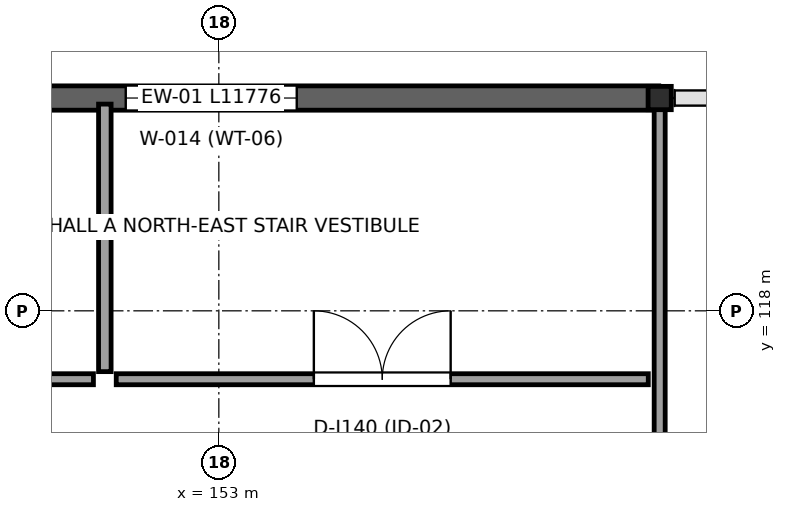
"""IFC4 building model, lengths in metres.
Left out: names, types, materials, properties, quantities, classifications, styles, units other than length and angle.
Written with IfcOpenShell. Run it as: python <this file> out.ifc"""

import sys

from ifc_helpers import new_model, si_unit, direction, frame, frame_2d, origin, origin_2d, place, context, subcontext, project, spatial, rectangle, i_section, extrude, element, fill, save


model = new_model("IFC4")
c1 = context("Model", 3, precision=1e-05, world=origin(), true_north=direction((0.0, 1.0)))
c2 = subcontext(c1, "Body", "Model", "MODEL_VIEW")
j1 = project(units=[si_unit("LENGTHUNIT", "METRE"), si_unit("PLANEANGLEUNIT", "RADIAN")], contexts=[c1])
p1 = place(None, origin())
s1 = spatial("IfcSite", under=j1, at=p1, CompositionType="ELEMENT")
p2 = place(p1, origin())
s2 = spatial("IfcBuilding", under=s1, at=p2, CompositionType="ELEMENT")
p3 = place(p2, frame((0.0, 0.0, 6.0)))
s3 = spatial("IfcBuildingStorey", under=s2, at=p3, CompositionType="ELEMENT", Elevation=6.0)
p4 = place(p3, frame((158.8, 120.8, 0.0), z_axis=(0.0, 0.0, 1.0), x_axis=(1.0, 0.0, 0.0)))
e1 = element("IfcColumn", 1, at=p4, inside=s3, PredefinedType="COLUMN", context=c2, shape_type="SweptSolid", body=[
    extrude(i_section(OverallWidth=0.305, OverallDepth=0.307, WebThickness=0.01, FlangeThickness=0.015, at=origin_2d()), origin(), (0.0, 0.0, 1.0), 6.0),
])
p5 = place(p3, frame((147.012, 120.8, 0.0), z_axis=(0.0, 0.0, 1.0), x_axis=(1.0, 0.0, 0.0)))
e2 = element("IfcWall", 2, at=p5, inside=s3, PredefinedType="STANDARD", context=c2, shape_type="SweptSolid", body=[
    extrude(rectangle(XDim=11.776, YDim=0.32, at=frame_2d((5.888, 0.0))), origin(), (0.0, 0.0, 1.0), 5.78),
])
p6 = place(p5, frame((4.763, 0.0, 1.1)))
e3 = element("IfcOpeningElement", 3, at=p6, cuts=e2, PredefinedType="OPENING", context=c2, shape_type="SweptSolid", body=[
    extrude(rectangle(XDim=2.25, YDim=2.4, at=frame_2d((1.125, 1.2))), frame((0.0, 0.17, 0.0), z_axis=(0.0, -1.0, 0.0), x_axis=(1.0, 0.0, 0.0)), (0.0, 0.0, 1.0), 0.34),
])
p7 = place(p3, frame((121.75, 117.1, 0.0), z_axis=(0.0, 0.0, 1.0), x_axis=(1.0, 0.0, 0.0)))
e4 = element("IfcWall", 4, at=p7, inside=s3, PredefinedType="PARTITIONING", context=c2, shape_type="SweptSolid", body=[
    extrude(rectangle(XDim=29.6, YDim=0.145, at=frame_2d((14.8, 0.0))), origin(), (0.0, 0.0, 1.0), 4.55),
])
p8 = place(p7, frame((2.5, 0.0, 0.0)))
e5 = element("IfcOpeningElement", 5, at=p8, cuts=e4, PredefinedType="OPENING", context=c2, shape_type="SweptSolid", body=[
    extrude(rectangle(XDim=0.98, YDim=2.15, at=frame_2d((0.49, 1.075))), frame((0.0, 0.083, 0.0), z_axis=(0.0, -1.0, 0.0), x_axis=(1.0, 0.0, 0.0)), (0.0, 0.0, 1.0), 0.165),
])
p9 = place(p7, frame((6.5, 0.0, 0.0)))
e6 = element("IfcOpeningElement", 6, at=p9, cuts=e4, PredefinedType="OPENING", context=c2, shape_type="SweptSolid", body=[
    extrude(rectangle(XDim=1.05, YDim=2.18, at=frame_2d((0.525, 1.09))), frame((0.0, 0.083, 0.0), z_axis=(0.0, -1.0, 0.0), x_axis=(1.0, 0.0, 0.0)), (0.0, 0.0, 1.0), 0.165),
])
p10 = place(p3, frame((151.65, 117.1, 0.0), z_axis=(0.0, 0.0, 1.0), x_axis=(1.0, 0.0, 0.0)))
e7 = element("IfcWall", 7, at=p10, inside=s3, PredefinedType="PARTITIONING", context=c2, shape_type="SweptSolid", body=[
    extrude(rectangle(XDim=7.0, YDim=0.145, at=frame_2d((3.5, 0.0))), origin(), (0.0, 0.0, 1.0), 4.55),
])
p11 = place(p10, frame((2.6, 0.0, 0.0)))
e8 = element("IfcOpeningElement", 8, at=p11, cuts=e7, PredefinedType="OPENING", context=c2, shape_type="SweptSolid", body=[
    extrude(rectangle(XDim=1.8, YDim=2.3, at=frame_2d((0.9, 1.15))), frame((0.0, 0.083, 0.0), z_axis=(0.0, -1.0, 0.0), x_axis=(1.0, 0.0, 0.0)), (0.0, 0.0, 1.0), 0.165),
])
p12 = place(p3, frame((151.5, 117.2, 0.0), z_axis=(0.0, 0.0, 1.0), x_axis=(0.0, 1.0, 0.0)))
e9 = element("IfcWall", 9, at=p12, inside=s3, PredefinedType="PARTITIONING", context=c2, shape_type="SweptSolid", body=[
    extrude(rectangle(XDim=3.52, YDim=0.165, at=frame_2d((1.76, 0.0))), origin(), (0.0, 0.0, 1.0), 4.55),
])
p13 = place(p3, frame((158.8, 111.948, 0.0), z_axis=(0.0, 0.0, 1.0), x_axis=(0.0, 1.0, 0.0)))
e10 = element("IfcWall", 10, at=p13, inside=s3, PredefinedType="PARTITIONING", context=c2, shape_type="SweptSolid", body=[
    extrude(rectangle(XDim=8.704, YDim=0.145, at=frame_2d((4.352, 0.0))), origin(), (0.0, 0.0, 1.0), 4.55),
])
p14 = place(p6, origin())
e11 = element("IfcWindow", 11, at=p14, inside=s3, PartitioningType="SINGLE_PANEL", PredefinedType="WINDOW", context=c2, shape_type="SweptSolid", body=[
    extrude(rectangle(XDim=2.25, YDim=2.4, at=frame_2d((1.125, 1.2))), frame((0.0, 0.03, 0.0), z_axis=(0.0, -1.0, 0.0), x_axis=(1.0, 0.0, 0.0)), (0.0, 0.0, 1.0), 0.06),
])
fill(e3, e11)
p15 = place(p11, origin())
e12 = element("IfcDoor", 12, at=p15, inside=s3, OperationType="DOUBLE_DOOR_SINGLE_SWING", PredefinedType="DOOR", context=c2, shape_type="SweptSolid", body=[
    extrude(rectangle(XDim=1.8, YDim=2.3, at=frame_2d((0.9, 1.15))), frame((0.0, 0.025, 0.0), z_axis=(0.0, -1.0, 0.0), x_axis=(1.0, 0.0, 0.0)), (0.0, 0.0, 1.0), 0.05),
])
fill(e8, e12)
save(model, sys.argv[1])
